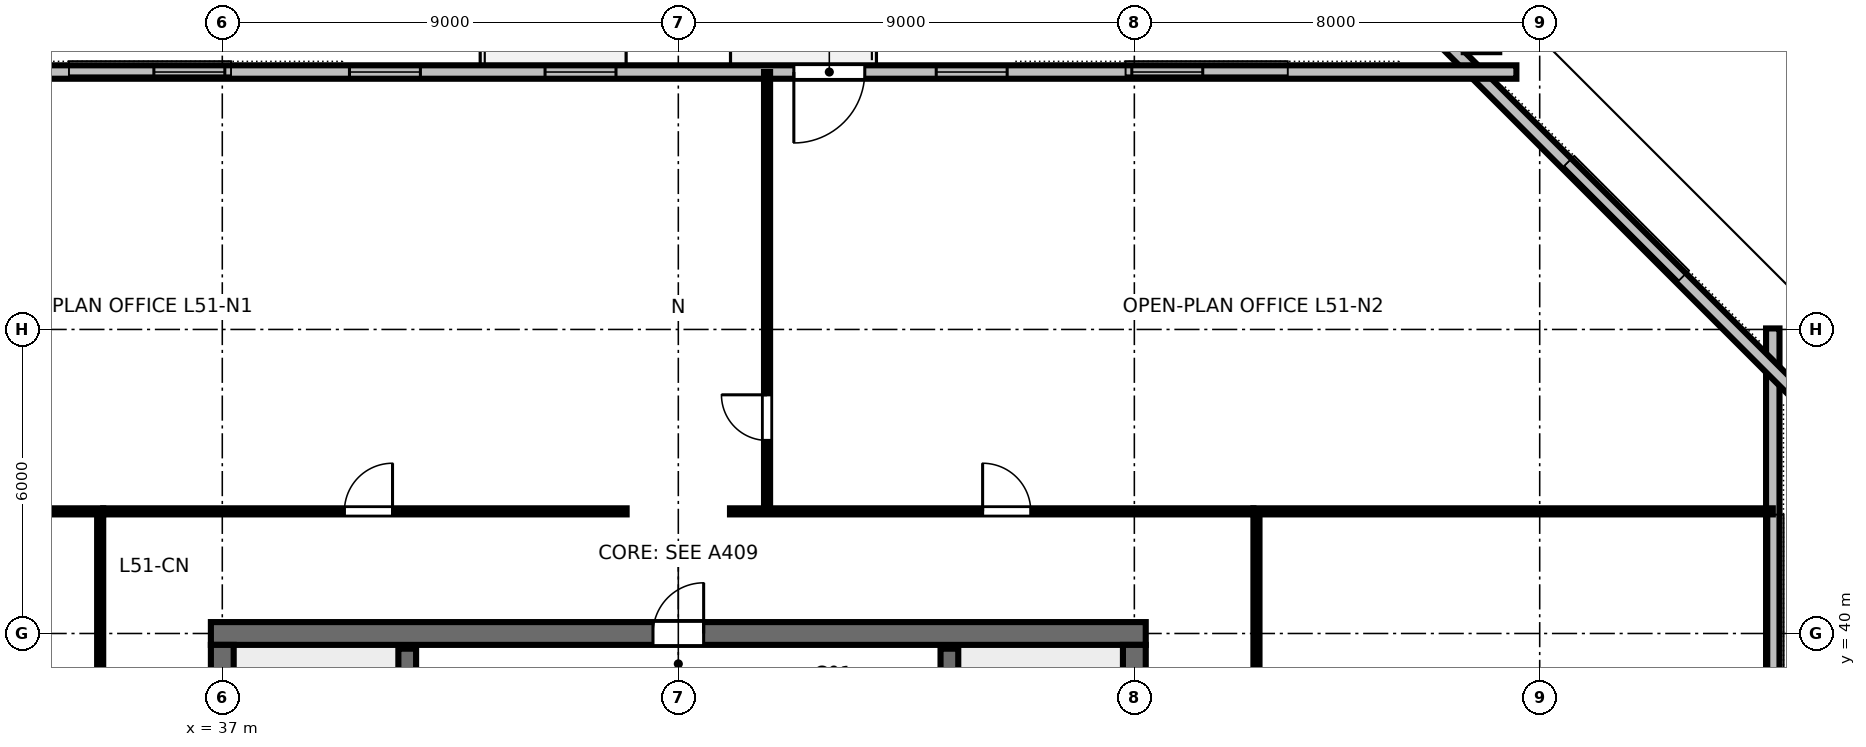
"""IFC4 building model, lengths in metres.
Left out: names, types, materials, properties, quantities, classifications, styles, units other than length and angle.
Written with IfcOpenShell. Run it as: python <this file> out.ifc"""

import sys

from ifc_helpers import new_model, si_unit, direction, frame, frame_2d, origin, origin_2d, place, context, subcontext, project, spatial, rectangle, hollow_rectangle, i_section, extrude, element, fill, save


model = new_model("IFC4")
c1 = context("Model", 3, precision=1e-05, world=origin(), true_north=direction((0.0, 1.0)))
c2 = subcontext(c1, "Body", "Model", "MODEL_VIEW")
j1 = project(units=[si_unit("LENGTHUNIT", "METRE"), si_unit("PLANEANGLEUNIT", "RADIAN")], contexts=[c1])
p1 = place(None, origin())
s1 = spatial("IfcSite", under=j1, at=p1, CompositionType="ELEMENT")
p2 = place(p1, origin())
s2 = spatial("IfcBuilding", under=s1, at=p2, CompositionType="ELEMENT")
p3 = place(p2, frame((0.0, 0.0, 195.0)))
s3 = spatial("IfcBuildingStorey", under=s2, at=p3, CompositionType="ELEMENT", Elevation=195.0)
p4 = place(p3, frame((36.775, 40.0, 0.0), z_axis=(0.0, 0.0, 1.0), x_axis=(1.0, 0.0, 0.0)))
e1 = element("IfcWall", 1, at=p4, inside=s3, PredefinedType="SHEAR", context=c2, shape_type="SweptSolid", body=[
    extrude(rectangle(XDim=18.45, YDim=0.45, at=frame_2d((9.225, 0.0))), origin(), (0.0, 0.0, 1.0), 3.36),
])
p5 = place(p4, frame((8.725, 0.0, 0.0)))
e2 = element("IfcOpeningElement", 2, at=p5, cuts=e1, PredefinedType="OPENING", context=c2, shape_type="SweptSolid", body=[
    extrude(rectangle(XDim=1.0, YDim=2.15, at=frame_2d((0.5, 1.075))), frame((0.0, 0.235, 0.0), z_axis=(0.0, -1.0, 0.0), x_axis=(1.0, 0.0, 0.0)), (0.0, 0.0, 1.0), 0.47),
])
p6 = place(p3, frame((37.0, 24.225, 0.0), z_axis=(0.0, 0.0, 1.0), x_axis=(0.0, 1.0, 0.0)))
e3 = element("IfcWall", 3, at=p6, inside=s3, PredefinedType="SHEAR", context=c2, shape_type="SweptSolid", body=[
    extrude(rectangle(XDim=15.55, YDim=0.45, at=frame_2d((7.775, 0.0))), origin(), (0.0, 0.0, 1.0), 3.36),
])
p7 = place(p6, frame((5.3, 0.0, 0.0)))
e4 = element("IfcOpeningElement", 4, at=p7, cuts=e3, PredefinedType="OPENING", context=c2, shape_type="SweptSolid", body=[
    extrude(rectangle(XDim=1.15, YDim=2.15, at=frame_2d((0.575, 1.075))), frame((0.0, 0.235, 0.0), z_axis=(0.0, -1.0, 0.0), x_axis=(1.0, 0.0, 0.0)), (0.0, 0.0, 1.0), 0.47),
])
p8 = place(p3, frame((55.0, 24.225, 0.0), z_axis=(0.0, 0.0, 1.0), x_axis=(0.0, 1.0, 0.0)))
e5 = element("IfcWall", 5, at=p8, inside=s3, PredefinedType="SHEAR", context=c2, shape_type="SweptSolid", body=[
    extrude(rectangle(XDim=15.55, YDim=0.45, at=frame_2d((7.775, 0.0))), origin(), (0.0, 0.0, 1.0), 3.36),
])
p9 = place(p8, frame((5.3, 0.0, 0.0)))
e6 = element("IfcOpeningElement", 6, at=p9, cuts=e5, PredefinedType="OPENING", context=c2, shape_type="SweptSolid", body=[
    extrude(rectangle(XDim=1.15, YDim=2.15, at=frame_2d((0.575, 1.075))), frame((0.0, 0.235, 0.0), z_axis=(0.0, -1.0, 0.0), x_axis=(1.0, 0.0, 0.0)), (0.0, 0.0, 1.0), 0.47),
])
p10 = place(p3, frame((68.363, 45.41, 0.0), z_axis=(-0.220934706476, -0.217976066682, 0.950617846365), x_axis=(0.676704084266, 0.667642023966, 0.310363835155)))
e7 = element("IfcColumn", 7, at=p10, inside=s3, PredefinedType="COLUMN", context=c2, shape_type="SweptSolid", body=[
    extrude(hollow_rectangle(XDim=0.7, YDim=0.85, WallThickness=0.04, at=origin_2d()), origin(), (0.0, 0.0, 1.0), 3.548),
])
p11 = place(p3, frame((61.851, 51.897, 0.0), z_axis=(-0.251481665301, -0.187288203866, 0.949568376006), x_axis=(0.597296145547, -0.802020769379, 0.0)))
e8 = element("IfcColumn", 8, at=p11, inside=s3, PredefinedType="COLUMN", context=c2, shape_type="SweptSolid", body=[
    extrude(hollow_rectangle(XDim=0.7, YDim=0.85, WallThickness=0.04, at=origin_2d()), origin(), (0.0, 0.0, 1.0), 3.552),
])
p12 = place(p3, frame((46.0, 51.74, 0.0), z_axis=(0.0, -0.192002682774, 0.981394400742), x_axis=(1.0, 0.0, 0.0)))
e9 = element("IfcColumn", 9, at=p12, inside=s3, PredefinedType="COLUMN", context=c2, shape_type="SweptSolid", body=[
    extrude(i_section(OverallWidth=0.401, OverallDepth=0.399, WebThickness=0.025, FlangeThickness=0.04, FilletRadius=0.025, at=origin_2d()), origin(), (0.0, 0.0, 1.0), 3.437),
])
p13 = place(p3, frame((67.6, 17.98, 0.0), z_axis=(0.0, 0.0, 1.0), x_axis=(0.0, 1.0, 0.0)))
e10 = element("IfcWall", 10, at=p13, inside=s3, PredefinedType="STANDARD", context=c2, shape_type="SweptSolid", body=[
    extrude(rectangle(XDim=28.04, YDim=0.265, at=frame_2d((14.02, 0.0))), origin(), (0.0, 0.0, 1.0), 2.832),
])
p14 = place(p3, frame((68.174, 44.635, 0.0), z_axis=(0.0, 0.0, 1.0), x_axis=(-0.707106781187, 0.707106781187, 0.0)))
e11 = element("IfcWall", 11, at=p14, inside=s3, PredefinedType="STANDARD", context=c2, shape_type="SweptSolid", body=[
    extrude(rectangle(XDim=9.927, YDim=0.265, at=frame_2d((4.963, 0.0))), origin(), (0.0, 0.0, 1.0), 3.375),
])
p15 = place(p3, frame((62.54, 51.08, 0.0), z_axis=(0.0, 0.0, 1.0), x_axis=(-1.0, 0.0, 0.0)))
e12 = element("IfcWall", 12, at=p15, inside=s3, PredefinedType="STANDARD", context=c2, shape_type="SweptSolid", body=[
    extrude(rectangle(XDim=33.08, YDim=0.265, at=frame_2d((16.54, 0.0))), origin(), (0.0, 0.0, 1.0), 2.832),
])
p16 = place(p15, frame((12.86, 0.0, 0.0)))
e13 = element("IfcOpeningElement", 13, at=p16, cuts=e12, PredefinedType="OPENING", context=c2, shape_type="SweptSolid", body=[
    extrude(rectangle(XDim=1.4, YDim=2.15, at=frame_2d((0.7, 1.075))), frame((0.0, 0.142, 0.0), z_axis=(0.0, -1.0, 0.0), x_axis=(1.0, 0.0, 0.0)), (0.0, 0.0, 1.0), 0.285),
])
p17 = place(p15, frame((6.19, 0.0, 0.85)))
e14 = element("IfcOpeningElement", 14, at=p17, cuts=e12, PredefinedType="OPENING", context=c2, shape_type="SweptSolid", body=[
    extrude(rectangle(XDim=1.4, YDim=1.2, at=frame_2d((0.7, 0.6))), frame((0.0, 0.142, 0.0), z_axis=(0.0, -1.0, 0.0), x_axis=(1.0, 0.0, 0.0)), (0.0, 0.0, 1.0), 0.285),
])
p18 = place(p15, frame((10.05, 0.0, 0.85)))
e15 = element("IfcOpeningElement", 15, at=p18, cuts=e12, PredefinedType="OPENING", context=c2, shape_type="SweptSolid", body=[
    extrude(rectangle(XDim=1.4, YDim=1.2, at=frame_2d((0.7, 0.6))), frame((0.0, 0.142, 0.0), z_axis=(0.0, -1.0, 0.0), x_axis=(1.0, 0.0, 0.0)), (0.0, 0.0, 1.0), 0.285),
])
p19 = place(p15, frame((17.77, 0.0, 0.85)))
e16 = element("IfcOpeningElement", 16, at=p19, cuts=e12, PredefinedType="OPENING", context=c2, shape_type="SweptSolid", body=[
    extrude(rectangle(XDim=1.4, YDim=1.2, at=frame_2d((0.7, 0.6))), frame((0.0, 0.142, 0.0), z_axis=(0.0, -1.0, 0.0), x_axis=(1.0, 0.0, 0.0)), (0.0, 0.0, 1.0), 0.285),
])
p20 = place(p15, frame((21.63, 0.0, 0.85)))
e17 = element("IfcOpeningElement", 17, at=p20, cuts=e12, PredefinedType="OPENING", context=c2, shape_type="SweptSolid", body=[
    extrude(rectangle(XDim=1.4, YDim=1.2, at=frame_2d((0.7, 0.6))), frame((0.0, 0.142, 0.0), z_axis=(0.0, -1.0, 0.0), x_axis=(1.0, 0.0, 0.0)), (0.0, 0.0, 1.0), 0.285),
])
p21 = place(p15, frame((25.49, 0.0, 0.85)))
e18 = element("IfcOpeningElement", 18, at=p21, cuts=e12, PredefinedType="OPENING", context=c2, shape_type="SweptSolid", body=[
    extrude(rectangle(XDim=1.4, YDim=1.2, at=frame_2d((0.7, 0.6))), frame((0.0, 0.142, 0.0), z_axis=(0.0, -1.0, 0.0), x_axis=(1.0, 0.0, 0.0)), (0.0, 0.0, 1.0), 0.285),
])
for number, where, z_axis, x_axis in (
    (19, (40.65, 32.0, 0.0), (0.0, 0.0, 1.0), (0.0, 1.0, 0.0)),
    (20, (51.35, 32.0, 0.0), (0.0, 0.0, 1.0), (0.0, 1.0, 0.0)),
):
    element("IfcWall", number, at=place(p3, frame(where, z_axis=z_axis, x_axis=x_axis)), inside=s3, PredefinedType="SHEAR", context=c2, shape_type="SweptSolid", body=[
        extrude(rectangle(XDim=7.7, YDim=0.35, at=frame_2d((3.85, 0.0))), origin(), (0.0, 0.0, 1.0), 3.6),
    ])
p22 = place(p3, frame((47.751, 42.41, 0.0), z_axis=(0.0, 0.0, 1.0), x_axis=(0.0, 1.0, 0.0)))
e21 = element("IfcWall", 21, at=p22, inside=s3, PredefinedType="PARTITIONING", context=c2, shape_type="SweptSolid", body=[
    extrude(rectangle(XDim=8.67, YDim=0.12, at=frame_2d((4.335, 0.0))), origin(), (0.0, 0.0, 1.0), 2.655),
])
p23 = place(p22, frame((1.4, 0.0, 0.0)))
e22 = element("IfcOpeningElement", 22, at=p23, cuts=e21, PredefinedType="OPENING", context=c2, shape_type="SweptSolid", body=[
    extrude(rectangle(XDim=0.9, YDim=2.15, at=frame_2d((0.45, 1.075))), frame((0.0, 0.07, 0.0), z_axis=(0.0, -1.0, 0.0), x_axis=(1.0, 0.0, 0.0)), (0.0, 0.0, 1.0), 0.14),
])
p24 = place(p3, frame((34.65, 42.41, 0.0), z_axis=(0.0, 0.0, 1.0), x_axis=(1.0, 0.0, 0.0)))
e23 = element("IfcWall", 23, at=p24, inside=s3, PredefinedType="PARTITIONING", context=c2, shape_type="SweptSolid", body=[
    extrude(rectangle(XDim=10.33, YDim=0.12, at=frame_2d((5.165, 0.0))), origin(), (0.0, 0.0, 1.0), 2.655),
])
p25 = place(p24, frame((4.76, 0.0, 0.0)))
e24 = element("IfcOpeningElement", 24, at=p25, cuts=e23, PredefinedType="OPENING", context=c2, shape_type="SweptSolid", body=[
    extrude(rectangle(XDim=0.95, YDim=2.15, at=frame_2d((0.475, 1.075))), frame((0.0, 0.07, 0.0), z_axis=(0.0, -1.0, 0.0), x_axis=(1.0, 0.0, 0.0)), (0.0, 0.0, 1.0), 0.14),
])
p26 = place(p3, frame((47.02, 42.41, 0.0), z_axis=(0.0, 0.0, 1.0), x_axis=(1.0, 0.0, 0.0)))
e25 = element("IfcWall", 25, at=p26, inside=s3, PredefinedType="PARTITIONING", context=c2, shape_type="SweptSolid", body=[
    extrude(rectangle(XDim=10.33, YDim=0.12, at=frame_2d((5.165, 0.0))), origin(), (0.0, 0.0, 1.0), 2.655),
])
p27 = place(p26, frame((4.986, 0.0, 0.0)))
e26 = element("IfcOpeningElement", 26, at=p27, cuts=e25, PredefinedType="OPENING", context=c2, shape_type="SweptSolid", body=[
    extrude(rectangle(XDim=0.95, YDim=2.15, at=frame_2d((0.475, 1.075))), frame((0.0, 0.07, 0.0), z_axis=(0.0, -1.0, 0.0), x_axis=(1.0, 0.0, 0.0)), (0.0, 0.0, 1.0), 0.14),
])
p28 = place(p3, frame((34.59, 21.65, 0.0), z_axis=(0.0, 0.0, 1.0), x_axis=(0.0, 1.0, 0.0)))
e27 = element("IfcWall", 27, at=p28, inside=s3, PredefinedType="PARTITIONING", context=c2, shape_type="SweptSolid", body=[
    extrude(rectangle(XDim=20.7, YDim=0.12, at=frame_2d((10.35, 0.0))), origin(), (0.0, 0.0, 1.0), 2.655),
])
p29 = place(p28, frame((6.214, 0.0, 0.0)))
e28 = element("IfcOpeningElement", 28, at=p29, cuts=e27, PredefinedType="OPENING", context=c2, shape_type="SweptSolid", body=[
    extrude(rectangle(XDim=0.95, YDim=2.15, at=frame_2d((0.475, 1.075))), frame((0.0, 0.07, 0.0), z_axis=(0.0, -1.0, 0.0), x_axis=(1.0, 0.0, 0.0)), (0.0, 0.0, 1.0), 0.14),
])
p30 = place(p28, frame((16.365, 0.0, 0.0)))
e29 = element("IfcOpeningElement", 29, at=p30, cuts=e27, PredefinedType="OPENING", context=c2, shape_type="SweptSolid", body=[
    extrude(rectangle(XDim=0.95, YDim=2.15, at=frame_2d((0.475, 1.075))), frame((0.0, 0.07, 0.0), z_axis=(0.0, -1.0, 0.0), x_axis=(1.0, 0.0, 0.0)), (0.0, 0.0, 1.0), 0.14),
])
p31 = place(p3, frame((57.41, 21.65, 0.0), z_axis=(0.0, 0.0, 1.0), x_axis=(0.0, 1.0, 0.0)))
e30 = element("IfcWall", 30, at=p31, inside=s3, PredefinedType="PARTITIONING", context=c2, shape_type="SweptSolid", body=[
    extrude(rectangle(XDim=20.7, YDim=0.12, at=frame_2d((10.35, 0.0))), origin(), (0.0, 0.0, 1.0), 2.655),
])
p32 = place(p31, frame((9.875, 0.0, 0.0)))
e31 = element("IfcOpeningElement", 31, at=p32, cuts=e30, PredefinedType="OPENING", context=c2, shape_type="SweptSolid", body=[
    extrude(rectangle(XDim=0.95, YDim=2.15, at=frame_2d((0.475, 1.075))), frame((0.0, 0.07, 0.0), z_axis=(0.0, -1.0, 0.0), x_axis=(1.0, 0.0, 0.0)), (0.0, 0.0, 1.0), 0.14),
])
for number, where, z_axis, x_axis in (
    (32, (34.65, 42.41, 0.0), (0.0, 0.0, 1.0), (-1.0, 0.0, 0.0)),
    (33, (57.35, 42.41, 0.0), (0.0, 0.0, 1.0), (1.0, 0.0, 0.0)),
):
    element("IfcWall", number, at=place(p3, frame(where, z_axis=z_axis, x_axis=x_axis)), inside=s3, PredefinedType="PARTITIONING", context=c2, shape_type="SweptSolid", body=[
        extrude(rectangle(XDim=10.25, YDim=0.12, at=frame_2d((5.125, 0.0))), origin(), (0.0, 0.0, 1.0), 2.655),
    ])
p33 = place(p16, origin())
e34 = element("IfcDoor", 34, at=p33, inside=s3, OperationType="SINGLE_SWING_RIGHT", PredefinedType="DOOR", context=c2, shape_type="SweptSolid", body=[
    extrude(rectangle(XDim=1.4, YDim=2.15, at=frame_2d((0.7, 1.075))), frame((0.0, 0.025, 0.0), z_axis=(0.0, -1.0, 0.0), x_axis=(1.0, 0.0, 0.0)), (0.0, 0.0, 1.0), 0.05),
])
fill(e13, e34)
p34 = place(p17, origin())
e35 = element("IfcWindow", 35, at=p34, inside=s3, PartitioningType="SINGLE_PANEL", PredefinedType="WINDOW", context=c2, shape_type="SweptSolid", body=[
    extrude(rectangle(XDim=1.4, YDim=1.2, at=frame_2d((0.7, 0.6))), frame((0.0, 0.03, 0.0), z_axis=(0.0, -1.0, 0.0), x_axis=(1.0, 0.0, 0.0)), (0.0, 0.0, 1.0), 0.06),
])
fill(e14, e35)
p35 = place(p18, origin())
e36 = element("IfcWindow", 36, at=p35, inside=s3, PartitioningType="SINGLE_PANEL", PredefinedType="WINDOW", context=c2, shape_type="SweptSolid", body=[
    extrude(rectangle(XDim=1.4, YDim=1.2, at=frame_2d((0.7, 0.6))), frame((0.0, 0.03, 0.0), z_axis=(0.0, -1.0, 0.0), x_axis=(1.0, 0.0, 0.0)), (0.0, 0.0, 1.0), 0.06),
])
fill(e15, e36)
p36 = place(p19, origin())
e37 = element("IfcWindow", 37, at=p36, inside=s3, PartitioningType="SINGLE_PANEL", PredefinedType="WINDOW", context=c2, shape_type="SweptSolid", body=[
    extrude(rectangle(XDim=1.4, YDim=1.2, at=frame_2d((0.7, 0.6))), frame((0.0, 0.03, 0.0), z_axis=(0.0, -1.0, 0.0), x_axis=(1.0, 0.0, 0.0)), (0.0, 0.0, 1.0), 0.06),
])
fill(e16, e37)
p37 = place(p20, origin())
e38 = element("IfcWindow", 38, at=p37, inside=s3, PartitioningType="SINGLE_PANEL", PredefinedType="WINDOW", context=c2, shape_type="SweptSolid", body=[
    extrude(rectangle(XDim=1.4, YDim=1.2, at=frame_2d((0.7, 0.6))), frame((0.0, 0.03, 0.0), z_axis=(0.0, -1.0, 0.0), x_axis=(1.0, 0.0, 0.0)), (0.0, 0.0, 1.0), 0.06),
])
fill(e17, e38)
p38 = place(p21, origin())
e39 = element("IfcWindow", 39, at=p38, inside=s3, PartitioningType="SINGLE_PANEL", PredefinedType="WINDOW", context=c2, shape_type="SweptSolid", body=[
    extrude(rectangle(XDim=1.4, YDim=1.2, at=frame_2d((0.7, 0.6))), frame((0.0, 0.03, 0.0), z_axis=(0.0, -1.0, 0.0), x_axis=(1.0, 0.0, 0.0)), (0.0, 0.0, 1.0), 0.06),
])
fill(e18, e39)
p39 = place(p5, origin())
e40 = element("IfcDoor", 40, at=p39, inside=s3, OperationType="SINGLE_SWING_RIGHT", PredefinedType="DOOR", context=c2, shape_type="SweptSolid", body=[
    extrude(rectangle(XDim=1.0, YDim=2.15, at=frame_2d((0.5, 1.075))), frame((0.0, 0.025, 0.0), z_axis=(0.0, -1.0, 0.0), x_axis=(1.0, 0.0, 0.0)), (0.0, 0.0, 1.0), 0.05),
])
fill(e2, e40)
p40 = place(p23, origin())
e41 = element("IfcDoor", 41, at=p40, inside=s3, OperationType="SINGLE_SWING_RIGHT", PredefinedType="DOOR", context=c2, shape_type="SweptSolid", body=[
    extrude(rectangle(XDim=0.9, YDim=2.15, at=frame_2d((0.45, 1.075))), frame((0.0, 0.025, 0.0), z_axis=(0.0, -1.0, 0.0), x_axis=(1.0, 0.0, 0.0)), (0.0, 0.0, 1.0), 0.05),
])
fill(e22, e41)
p41 = place(p25, origin())
e42 = element("IfcDoor", 42, at=p41, inside=s3, OperationType="SINGLE_SWING_RIGHT", PredefinedType="DOOR", context=c2, shape_type="SweptSolid", body=[
    extrude(rectangle(XDim=0.95, YDim=2.15, at=frame_2d((0.475, 1.075))), frame((0.0, 0.025, 0.0), z_axis=(0.0, -1.0, 0.0), x_axis=(1.0, 0.0, 0.0)), (0.0, 0.0, 1.0), 0.05),
])
fill(e24, e42)
p42 = place(p27, origin())
e43 = element("IfcDoor", 43, at=p42, inside=s3, OperationType="SINGLE_SWING_LEFT", PredefinedType="DOOR", context=c2, shape_type="SweptSolid", body=[
    extrude(rectangle(XDim=0.95, YDim=2.15, at=frame_2d((0.475, 1.075))), frame((0.0, 0.025, 0.0), z_axis=(0.0, -1.0, 0.0), x_axis=(1.0, 0.0, 0.0)), (0.0, 0.0, 1.0), 0.05),
])
fill(e26, e43)
save(model, sys.argv[1])
